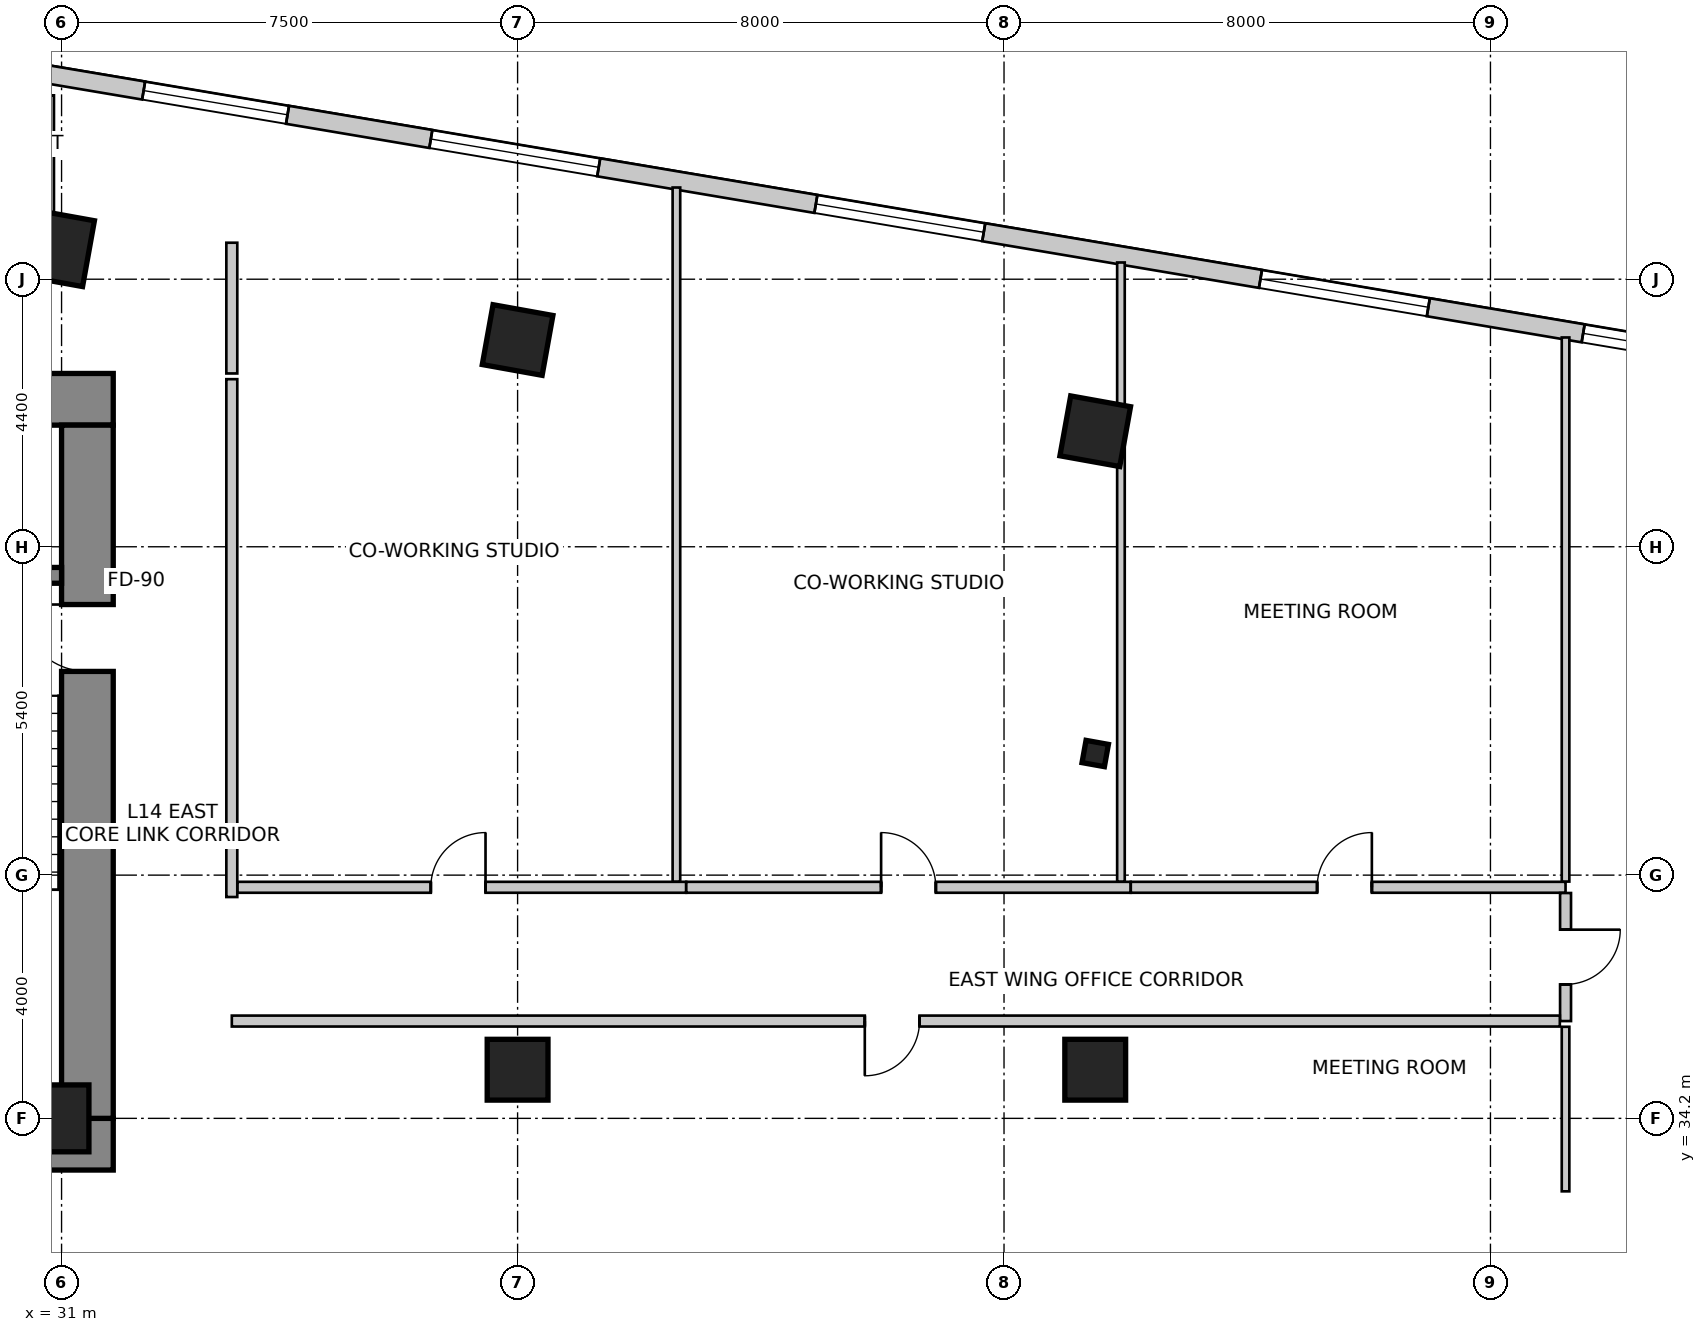
"""IFC4 building model, lengths in metres.
Left out: names, types, materials, properties, quantities, classifications, styles, units other than length and angle.
Written with IfcOpenShell. Run it as: python <this file> out.ifc"""

import sys

from ifc_helpers import new_model, si_unit, direction, frame, frame_2d, origin, origin_2d, place, context, subcontext, project, spatial, rectangle, i_section, extrude, source, transform, mapped, element, fill, save


model = new_model("IFC4")
c1 = context("Model", 3, precision=1e-05, world=origin(), true_north=direction((0.0, 1.0)))
c2 = subcontext(c1, "Body", "Model", "MODEL_VIEW")
j1 = project(units=[si_unit("LENGTHUNIT", "METRE"), si_unit("PLANEANGLEUNIT", "RADIAN")], contexts=[c1])
p1 = place(None, origin())
s1 = spatial("IfcSite", under=j1, at=p1, CompositionType="ELEMENT")
p2 = place(p1, origin())
s2 = spatial("IfcBuilding", under=s1, at=p2, CompositionType="ELEMENT")
p3 = place(p2, frame((0.0, 0.0, 59.0)))
s3 = spatial("IfcBuildingStorey", under=s2, at=p3, CompositionType="ELEMENT", Elevation=59.0)
p4 = place(p3, frame((15.75, 46.025, 0.0), z_axis=(0.0, 0.0, 1.0), x_axis=(1.0, 0.0, 0.0)))
e1 = element("IfcWall", 1, at=p4, inside=s3, PredefinedType="SHEAR", context=c2, shape_type="SweptSolid", body=[
    extrude(rectangle(XDim=16.1, YDim=0.85, at=frame_2d((8.05, 0.0))), origin(), (0.0, 0.0, 1.0), 4.0),
])
p5 = place(p3, frame((15.75, 33.775, 0.0), z_axis=(0.0, 0.0, 1.0), x_axis=(1.0, 0.0, 0.0)))
e2 = element("IfcWall", 2, at=p5, inside=s3, PredefinedType="SHEAR", context=c2, shape_type="SweptSolid", body=[
    extrude(rectangle(XDim=16.1, YDim=0.85, at=frame_2d((8.05, 0.0))), origin(), (0.0, 0.0, 1.0), 4.0),
])
m1 = source(origin(), c2, "Body", "SweptSolid", [
    extrude(rectangle(XDim=1.3, YDim=2.15, at=frame_2d((0.65, 1.075))), frame((0.0, 0.435, 0.0), z_axis=(0.0, -1.0, 0.0), x_axis=(1.0, 0.0, 0.0)), (0.0, 0.0, 1.0), 0.87),
])
p6 = place(p5, frame((10.18, 0.0, 0.0)))
e3 = element("IfcOpeningElement", 3, at=p6, cuts=e2, PredefinedType="OPENING", context=c2, shape_type="MappedRepresentation", body=[
    mapped(m1, transform((0.0, 0.0, 0.0), scale=1.0)),
])
p7 = place(p3, frame((31.425, 34.2, 0.0), z_axis=(0.0, 0.0, 1.0), x_axis=(0.0, 1.0, 0.0)))
e4 = element("IfcWall", 4, at=p7, inside=s3, PredefinedType="SHEAR", context=c2, shape_type="SweptSolid", body=[
    extrude(rectangle(XDim=11.4, YDim=0.85, at=frame_2d((5.7, 0.0))), origin(), (0.0, 0.0, 1.0), 4.0),
])
m2 = source(origin(), c2, "Body", "SweptSolid", [
    extrude(rectangle(XDim=1.1, YDim=2.15, at=frame_2d((0.55, 1.075))), frame((0.0, 0.435, 0.0), z_axis=(0.0, -1.0, 0.0), x_axis=(1.0, 0.0, 0.0)), (0.0, 0.0, 1.0), 0.87),
])
p8 = place(p7, frame((7.35, 0.0, 0.0)))
e5 = element("IfcOpeningElement", 5, at=p8, cuts=e4, PredefinedType="OPENING", context=c2, shape_type="MappedRepresentation", body=[
    mapped(m2, transform((0.0, 0.0, 0.0), scale=1.0)),
])
p9 = place(p3, frame((27.5, 43.13, 0.0), z_axis=(0.0, 0.0, 1.0), x_axis=(1.0, 0.0, 0.0)))
e6 = element("IfcWall", 6, at=p9, inside=s3, PredefinedType="SHEAR", context=c2, shape_type="SweptSolid", body=[
    extrude(rectangle(XDim=3.5, YDim=0.26, at=frame_2d((1.75, 0.0))), origin(), (0.0, 0.0, 1.0), 4.0),
])
m3 = source(origin(), c2, "Body", "SweptSolid", [
    extrude(rectangle(XDim=0.9, YDim=1.1, at=origin_2d()), origin(), (0.0, 0.0, 1.0), 4.0),
])
p10 = place(p3, frame((31.0, 48.5, 0.0), z_axis=(0.0, 0.0, 1.0), x_axis=(0.984195607969, -0.17708474032, 0.0)))
e7 = element("IfcColumn", 7, at=p10, inside=s3, PredefinedType="COLUMN", context=c2, shape_type="MappedRepresentation", body=[
    mapped(m3, transform((0.0, 0.0, 0.0), scale=1.0)),
])
m4 = source(origin(), c2, "Body", "SweptSolid", [
    extrude(rectangle(XDim=1.0, YDim=1.0, at=origin_2d()), origin(), (0.0, 0.0, 1.0), 4.0),
])
for number, where, z_axis, x_axis in (
    (8, (38.5, 47.0, 0.0), (0.0, 0.0, 1.0), (0.984, -0.177, 0.0)),
    (9, (48.0, 45.5, 0.0), (0.0, 0.0, 1.0), (0.984, -0.177, 0.0)),
):
    element("IfcColumn", number, at=place(p3, frame(where, z_axis=z_axis, x_axis=x_axis)), inside=s3, PredefinedType="COLUMN", context=c2, shape_type="MappedRepresentation", body=[
        mapped(m4, transform((0.0, 0.0, 0.0), scale=1.0)),
    ])
p11 = place(p3, frame((31.0, 34.2, 0.0), z_axis=(0.0, 0.0, 1.0), x_axis=(1.0, 0.0, 0.0)))
e10 = element("IfcColumn", 10, at=p11, inside=s3, PredefinedType="COLUMN", context=c2, shape_type="MappedRepresentation", body=[
    mapped(m3, transform((0.0, 0.0, 0.0), scale=1.0)),
])
for number, where, z_axis, x_axis in (
    (11, (38.5, 35.0, 0.0), (0.0, 0.0, 1.0), (1.0, 0.0, 0.0)),
    (12, (48.0, 35.0, 0.0), (0.0, 0.0, 1.0), (1.0, 0.0, 0.0)),
):
    element("IfcColumn", number, at=place(p3, frame(where, z_axis=z_axis, x_axis=x_axis)), inside=s3, PredefinedType="COLUMN", context=c2, shape_type="MappedRepresentation", body=[
        mapped(m4, transform((0.0, 0.0, 0.0), scale=1.0)),
    ])
m5 = source(origin(), c2, "Body", "SweptSolid", [
    extrude(i_section(OverallWidth=0.374, OverallDepth=0.372, WebThickness=0.016, FlangeThickness=0.026, FilletRadius=0.015, at=origin_2d()), origin(), (0.0, 0.0, 1.0), 4.0),
])
p12 = place(p3, frame((48.0, 40.2, 0.0), z_axis=(0.0, 0.0, 1.0), x_axis=(0.984195607969, -0.17708474032, 0.0)))
e13 = element("IfcColumn", 13, at=p12, inside=s3, PredefinedType="COLUMN", context=c2, shape_type="MappedRepresentation", body=[
    mapped(m5, transform((0.0, 0.0, 0.0), scale=1.0)),
])
p13 = place(p3, frame((58.761, 46.648, 0.0), z_axis=(0.0, 0.0, 1.0), x_axis=(-0.98607502735, 0.166301053624, 0.0)))
e14 = element("IfcWall", 14, at=p13, inside=s3, PredefinedType="SOLIDWALL", context=c2, shape_type="SweptSolid", body=[
    extrude(rectangle(XDim=37.397, YDim=0.3, at=frame_2d((18.699, 0.0))), origin(), (0.0, 0.0, 1.0), 3.7),
])
m6 = source(origin(), c2, "Body", "SweptSolid", [
    extrude(rectangle(XDim=2.4, YDim=2.2, at=frame_2d((1.2, 1.1))), frame((0.0, 0.16, 0.0), z_axis=(0.0, -1.0, 0.0), x_axis=(1.0, 0.0, 0.0)), (0.0, 0.0, 1.0), 0.32),
])
p14 = place(p13, frame((0.375, 0.0, 0.85)))
e15 = element("IfcOpeningElement", 15, at=p14, cuts=e14, PredefinedType="OPENING", context=c2, shape_type="MappedRepresentation", body=[
    mapped(m6, transform((0.0, 0.0, 0.0), scale=1.0)),
])
m7 = source(origin(), c2, "Body", "SweptSolid", [
    extrude(rectangle(XDim=2.8, YDim=2.4, at=frame_2d((1.4, 1.2))), frame((0.0, 0.16, 0.0), z_axis=(0.0, -1.0, 0.0), x_axis=(1.0, 0.0, 0.0)), (0.0, 0.0, 1.0), 0.32),
])
p15 = place(p13, frame((5.357, 0.0, 0.85)))
e16 = element("IfcOpeningElement", 16, at=p15, cuts=e14, PredefinedType="OPENING", context=c2, shape_type="MappedRepresentation", body=[
    mapped(m7, transform((0.0, 0.0, 0.0), scale=1.0)),
])
p16 = place(p13, frame((12.772, 0.0, 0.85)))
e17 = element("IfcOpeningElement", 17, at=p16, cuts=e14, PredefinedType="OPENING", context=c2, shape_type="MappedRepresentation", body=[
    mapped(m7, transform((0.0, 0.0, 0.0), scale=1.0)),
])
p17 = place(p13, frame((19.194, 0.0, 0.85)))
e18 = element("IfcOpeningElement", 18, at=p17, cuts=e14, PredefinedType="OPENING", context=c2, shape_type="MappedRepresentation", body=[
    mapped(m7, transform((0.0, 0.0, 0.0), scale=1.0)),
])
p18 = place(p13, frame((24.384, 0.0, 0.85)))
e19 = element("IfcOpeningElement", 19, at=p18, cuts=e14, PredefinedType="OPENING", context=c2, shape_type="MappedRepresentation", body=[
    mapped(m6, transform((0.0, 0.0, 0.0), scale=1.0)),
])
p19 = place(p13, frame((29.757, 0.0, 0.85)))
e20 = element("IfcOpeningElement", 20, at=p19, cuts=e14, PredefinedType="OPENING", context=c2, shape_type="MappedRepresentation", body=[
    mapped(m7, transform((0.0, 0.0, 0.0), scale=1.0)),
])
p20 = place(p13, frame((34.256, 0.0, 0.85)))
e21 = element("IfcOpeningElement", 21, at=p20, cuts=e14, PredefinedType="OPENING", context=c2, shape_type="MappedRepresentation", body=[
    mapped(m7, transform((0.0, 0.0, 0.0), scale=1.0)),
])
p21 = place(p3, frame((25.362, 48.6, 0.0), z_axis=(0.0, 0.0, 1.0), x_axis=(1.0, 0.0, 0.0)))
e22 = element("IfcWall", 22, at=p21, inside=s3, PredefinedType="PARTITIONING", context=c2, shape_type="SweptSolid", body=[
    extrude(rectangle(XDim=5.598, YDim=0.18, at=frame_2d((2.799, 0.0))), origin(), (0.0, 0.0, 1.0), 2.842),
])
m8 = source(origin(), c2, "Body", "SweptSolid", [
    extrude(rectangle(XDim=0.9, YDim=2.15, at=frame_2d((0.45, 1.075))), frame((0.0, 0.1, 0.0), z_axis=(0.0, -1.0, 0.0), x_axis=(1.0, 0.0, 0.0)), (0.0, 0.0, 1.0), 0.2),
])
p22 = place(p21, frame((2.349, 0.0, 0.0)))
e23 = element("IfcOpeningElement", 23, at=p22, cuts=e22, PredefinedType="OPENING", context=c2, shape_type="MappedRepresentation", body=[
    mapped(m8, transform((0.0, 0.0, 0.0), scale=1.0)),
])
p23 = place(p3, frame((33.8, 48.6, 0.0), z_axis=(0.0, 0.0, 1.0), x_axis=(0.0, -1.0, 0.0)))
e24 = element("IfcWall", 24, at=p23, inside=s3, PredefinedType="PARTITIONING", context=c2, shape_type="SweptSolid", body=[
    extrude(rectangle(XDim=2.15, YDim=0.18, at=frame_2d((1.075, 0.0))), origin(), (0.0, 0.0, 1.0), 2.842),
])
p24 = place(p3, frame((33.8, 46.356, 0.0), z_axis=(0.0, 0.0, 1.0), x_axis=(0.0, -1.0, 0.0)))
e25 = element("IfcWall", 25, at=p24, inside=s3, PredefinedType="PARTITIONING", context=c2, shape_type="SweptSolid", body=[
    extrude(rectangle(XDim=8.516, YDim=0.18, at=frame_2d((4.258, 0.0))), origin(), (0.0, 0.0, 1.0), 3.272),
])
p25 = place(p3, frame((33.894, 38.0, 0.0), z_axis=(0.0, 0.0, 1.0), x_axis=(1.0, 0.0, 0.0)))
e26 = element("IfcWall", 26, at=p25, inside=s3, PredefinedType="PARTITIONING", context=c2, shape_type="SweptSolid", body=[
    extrude(rectangle(XDim=7.378, YDim=0.18, at=frame_2d((3.689, 0.0))), origin(), (0.0, 0.0, 1.0), 2.742),
])
p26 = place(p25, frame((3.179, 0.0, 0.0)))
e27 = element("IfcOpeningElement", 27, at=p26, cuts=e26, PredefinedType="OPENING", context=c2, shape_type="MappedRepresentation", body=[
    mapped(m8, transform((0.0, 0.0, 0.0), scale=1.0)),
])
p27 = place(p3, frame((41.274, 38.0, 0.0), z_axis=(0.0, 0.0, 1.0), x_axis=(1.0, 0.0, 0.0)))
e28 = element("IfcWall", 28, at=p27, inside=s3, PredefinedType="PARTITIONING", context=c2, shape_type="SweptSolid", body=[
    extrude(rectangle(XDim=7.309, YDim=0.18, at=frame_2d((3.655, 0.0))), origin(), (0.0, 0.0, 1.0), 3.075),
])
p28 = place(p27, frame((3.205, 0.0, 0.0)))
e29 = element("IfcOpeningElement", 29, at=p28, cuts=e28, PredefinedType="OPENING", context=c2, shape_type="MappedRepresentation", body=[
    mapped(m8, transform((0.0, 0.0, 0.0), scale=1.0)),
])
p29 = place(p3, frame((48.585, 38.0, 0.0), z_axis=(0.0, 0.0, 1.0), x_axis=(1.0, 0.0, 0.0)))
e30 = element("IfcWall", 30, at=p29, inside=s3, PredefinedType="PARTITIONING", context=c2, shape_type="SweptSolid", body=[
    extrude(rectangle(XDim=7.15, YDim=0.18, at=frame_2d((3.575, 0.0))), origin(), (0.0, 0.0, 1.0), 3.7),
])
p30 = place(p29, frame((3.064, 0.0, 0.0)))
e31 = element("IfcOpeningElement", 31, at=p30, cuts=e30, PredefinedType="OPENING", context=c2, shape_type="MappedRepresentation", body=[
    mapped(m8, transform((0.0, 0.0, 0.0), scale=1.0)),
])
p31 = place(p3, frame((55.735, 37.906, 0.0), z_axis=(0.0, 0.0, 1.0), x_axis=(0.0, -1.0, 0.0)))
e32 = element("IfcWall", 32, at=p31, inside=s3, PredefinedType="PARTITIONING", context=c2, shape_type="SweptSolid", body=[
    extrude(rectangle(XDim=2.106, YDim=0.18, at=frame_2d((1.053, 0.0))), origin(), (0.0, 0.0, 1.0), 3.7),
])
p32 = place(p31, frame((0.603, 0.0, 0.0)))
e33 = element("IfcOpeningElement", 33, at=p32, cuts=e32, PredefinedType="OPENING", context=c2, shape_type="MappedRepresentation", body=[
    mapped(m8, transform((0.0, 0.0, 0.0), scale=1.0)),
])
p33 = place(p3, frame((55.641, 35.8, 0.0), z_axis=(0.0, 0.0, 1.0), x_axis=(-1.0, 0.0, 0.0)))
e34 = element("IfcWall", 34, at=p33, inside=s3, PredefinedType="PARTITIONING", context=c2, shape_type="SweptSolid", body=[
    extrude(rectangle(XDim=21.841, YDim=0.18, at=frame_2d((10.92, 0.0))), origin(), (0.0, 0.0, 1.0), 2.742),
])
p34 = place(p33, frame((10.531, 0.0, 0.0)))
e35 = element("IfcOpeningElement", 35, at=p34, cuts=e34, PredefinedType="OPENING", context=c2, shape_type="MappedRepresentation", body=[
    mapped(m8, transform((0.0, 0.0, 0.0), scale=1.0)),
])
p35 = place(p3, frame((41.112, 49.508, 0.0), z_axis=(0.0, 0.0, 1.0), x_axis=(0.0, -1.0, 0.0)))
e36 = element("IfcWall", 36, at=p35, inside=s3, PredefinedType="PARTITIONING", context=c2, shape_type="SweptSolid", body=[
    extrude(rectangle(XDim=11.414, YDim=0.125, at=frame_2d((5.707, 0.0))), origin(), (0.0, 0.0, 1.0), 2.842),
])
p36 = place(p3, frame((48.423, 48.275, 0.0), z_axis=(0.0, 0.0, 1.0), x_axis=(0.0, -1.0, 0.0)))
e37 = element("IfcWall", 37, at=p36, inside=s3, PredefinedType="PARTITIONING", context=c2, shape_type="SweptSolid", body=[
    extrude(rectangle(XDim=10.181, YDim=0.125, at=frame_2d((5.091, 0.0))), origin(), (0.0, 0.0, 1.0), 3.7),
])
p37 = place(p3, frame((55.735, 47.042, 0.0), z_axis=(0.0, 0.0, 1.0), x_axis=(0.0, -1.0, 0.0)))
e38 = element("IfcWall", 38, at=p37, inside=s3, PredefinedType="PARTITIONING", context=c2, shape_type="SweptSolid", body=[
    extrude(rectangle(XDim=8.948, YDim=0.125, at=frame_2d((4.474, 0.0))), origin(), (0.0, 0.0, 1.0), 3.7),
])
p38 = place(p3, frame((55.735, 33.0, 0.0), z_axis=(0.0, 0.0, 1.0), x_axis=(0.0, 1.0, 0.0)))
e39 = element("IfcWall", 39, at=p38, inside=s3, PredefinedType="PARTITIONING", context=c2, shape_type="SweptSolid", body=[
    extrude(rectangle(XDim=2.706, YDim=0.125, at=frame_2d((1.353, 0.0))), origin(), (0.0, 0.0, 1.0), 3.7),
])
p39 = place(p3, frame((30.8, 51.024, 0.0), z_axis=(0.0, 0.0, 1.0), x_axis=(0.0, -1.0, 0.0)))
e40 = element("IfcWall", 40, at=p39, inside=s3, PredefinedType="PARTITIONING", context=c2, shape_type="SweptSolid", body=[
    extrude(rectangle(XDim=2.204, YDim=0.15, at=frame_2d((1.102, 0.0))), origin(), (0.0, 0.0, 1.0), 3.7),
])
m9 = source(origin(), c2, "Body", "SweptSolid", [
    extrude(rectangle(XDim=2.4, YDim=2.2, at=frame_2d((1.2, 1.1))), frame((0.0, -0.015, 0.0), z_axis=(0.0, -1.0, 0.0), x_axis=(1.0, 0.0, 0.0)), (0.0, 0.0, 1.0), 0.06),
])
p40 = place(p14, origin())
e41 = element("IfcWindow", 41, at=p40, inside=s3, PartitioningType="SINGLE_PANEL", PredefinedType="WINDOW", context=c2, shape_type="MappedRepresentation", body=[
    mapped(m9, transform((0.0, 0.0, 0.0), scale=1.0)),
])
fill(e15, e41)
m10 = source(origin(), c2, "Body", "SweptSolid", [
    extrude(rectangle(XDim=2.8, YDim=2.4, at=frame_2d((1.4, 1.2))), frame((0.0, -0.015, 0.0), z_axis=(0.0, -1.0, 0.0), x_axis=(1.0, 0.0, 0.0)), (0.0, 0.0, 1.0), 0.06),
])
p41 = place(p15, origin())
e42 = element("IfcWindow", 42, at=p41, inside=s3, PartitioningType="SINGLE_PANEL", PredefinedType="WINDOW", context=c2, shape_type="MappedRepresentation", body=[
    mapped(m10, transform((0.0, 0.0, 0.0), scale=1.0)),
])
fill(e16, e42)
p42 = place(p16, origin())
e43 = element("IfcWindow", 43, at=p42, inside=s3, PartitioningType="SINGLE_PANEL", PredefinedType="WINDOW", context=c2, shape_type="MappedRepresentation", body=[
    mapped(m10, transform((0.0, 0.0, 0.0), scale=1.0)),
])
fill(e17, e43)
p43 = place(p17, origin())
e44 = element("IfcWindow", 44, at=p43, inside=s3, PartitioningType="SINGLE_PANEL", PredefinedType="WINDOW", context=c2, shape_type="MappedRepresentation", body=[
    mapped(m10, transform((0.0, 0.0, 0.0), scale=1.0)),
])
fill(e18, e44)
p44 = place(p18, origin())
e45 = element("IfcWindow", 45, at=p44, inside=s3, PartitioningType="SINGLE_PANEL", PredefinedType="WINDOW", context=c2, shape_type="MappedRepresentation", body=[
    mapped(m9, transform((0.0, 0.0, 0.0), scale=1.0)),
])
fill(e19, e45)
m11 = source(origin(), c2, "Body", "SweptSolid", [
    extrude(rectangle(XDim=1.1, YDim=2.15, at=frame_2d((0.55, 1.075))), frame((0.0, 0.025, 0.0), z_axis=(0.0, -1.0, 0.0), x_axis=(1.0, 0.0, 0.0)), (0.0, 0.0, 1.0), 0.05),
])
p45 = place(p8, origin())
e46 = element("IfcDoor", 46, at=p45, inside=s3, OperationType="SINGLE_SWING_RIGHT", PredefinedType="DOOR", context=c2, shape_type="MappedRepresentation", body=[
    mapped(m11, transform((0.0, 0.0, 0.0), scale=1.0)),
])
fill(e5, e46)
m12 = source(origin(), c2, "Body", "SweptSolid", [
    extrude(rectangle(XDim=0.9, YDim=2.15, at=frame_2d((0.45, 1.075))), frame((0.0, 0.025, 0.0), z_axis=(0.0, -1.0, 0.0), x_axis=(1.0, 0.0, 0.0)), (0.0, 0.0, 1.0), 0.05),
])
p46 = place(p26, origin())
e47 = element("IfcDoor", 47, at=p46, inside=s3, OperationType="SINGLE_SWING_RIGHT", PredefinedType="DOOR", context=c2, shape_type="MappedRepresentation", body=[
    mapped(m12, transform((0.0, 0.0, 0.0), scale=1.0)),
])
fill(e27, e47)
p47 = place(p28, origin())
e48 = element("IfcDoor", 48, at=p47, inside=s3, OperationType="SINGLE_SWING_LEFT", PredefinedType="DOOR", context=c2, shape_type="MappedRepresentation", body=[
    mapped(m12, transform((0.0, 0.0, 0.0), scale=1.0)),
])
fill(e29, e48)
p48 = place(p30, origin())
e49 = element("IfcDoor", 49, at=p48, inside=s3, OperationType="SINGLE_SWING_RIGHT", PredefinedType="DOOR", context=c2, shape_type="MappedRepresentation", body=[
    mapped(m12, transform((0.0, 0.0, 0.0), scale=1.0)),
])
fill(e31, e49)
p49 = place(p32, origin())
e50 = element("IfcDoor", 50, at=p49, inside=s3, OperationType="SINGLE_SWING_LEFT", PredefinedType="DOOR", context=c2, shape_type="MappedRepresentation", body=[
    mapped(m12, transform((0.0, 0.0, 0.0), scale=1.0)),
])
fill(e33, e50)
p50 = place(p34, origin())
e51 = element("IfcDoor", 51, at=p50, inside=s3, OperationType="SINGLE_SWING_RIGHT", PredefinedType="DOOR", context=c2, shape_type="MappedRepresentation", body=[
    mapped(m12, transform((0.0, 0.0, 0.0), scale=1.0)),
])
fill(e35, e51)
save(model, sys.argv[1])
